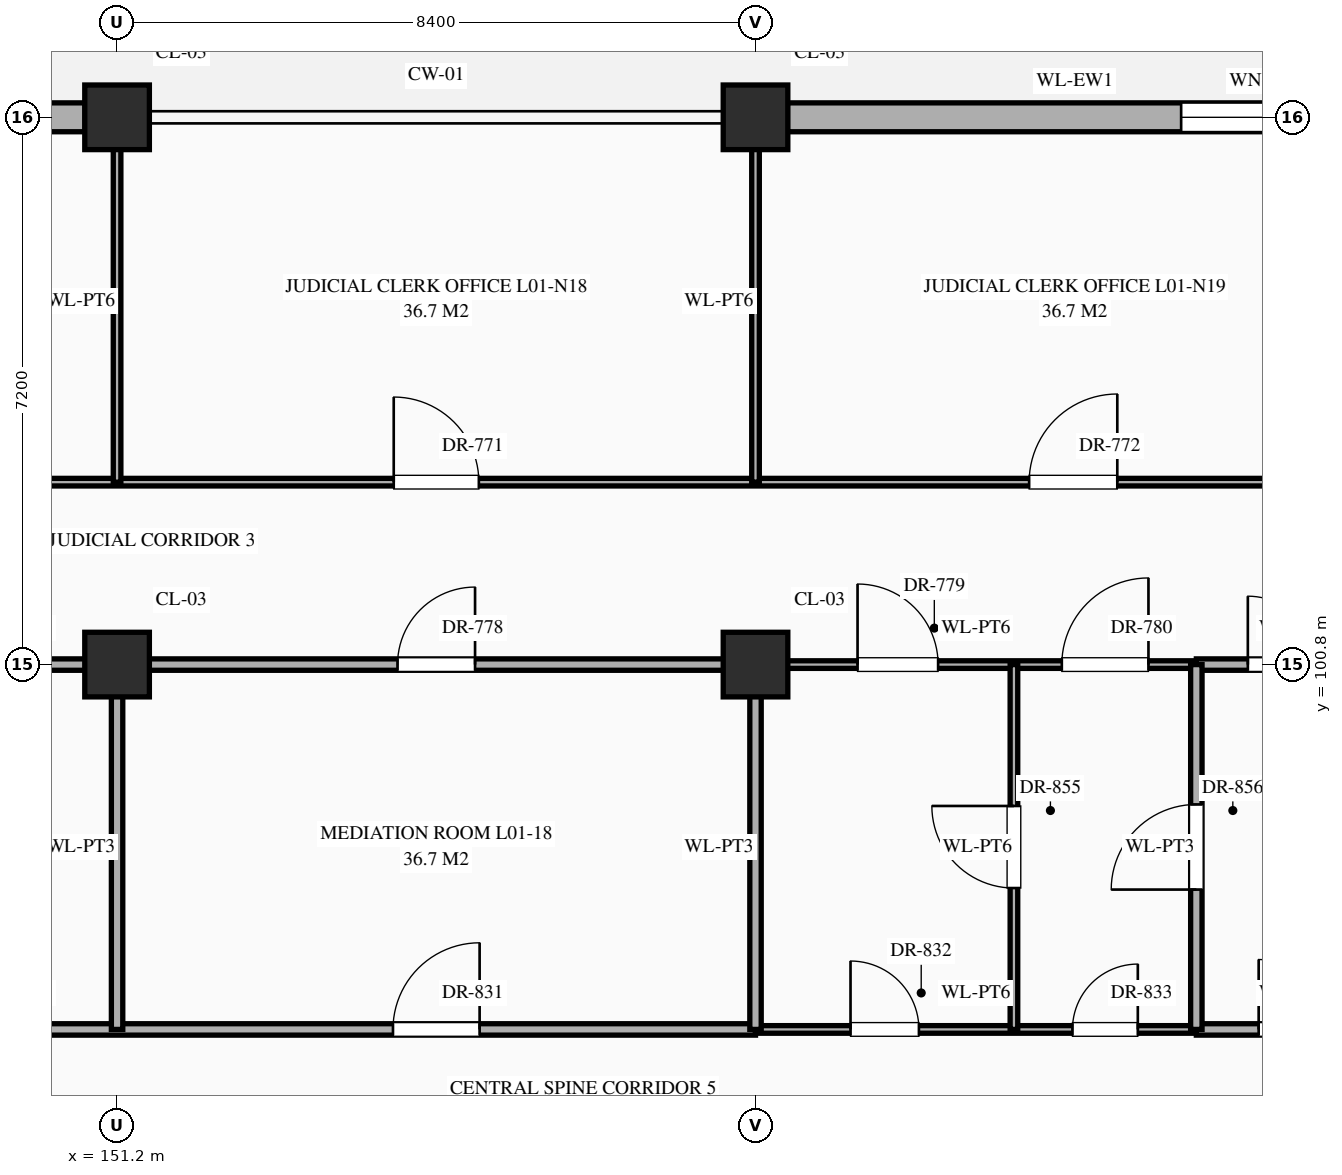
"""IFC4 building model, lengths in metres.
Left out: names, types, materials, properties, quantities, classifications, styles, units other than length and angle.
Written with IfcOpenShell. Run it as: python <this file> out.ifc"""

import sys

from ifc_helpers import new_model, si_unit, direction, frame, frame_2d, origin, origin_2d, place, context, subcontext, project, spatial, rectangle, extrude, element, fill, save


model = new_model("IFC4")
c1 = context("Model", 3, precision=1e-05, world=origin(), true_north=direction((0.0, 1.0)))
c2 = subcontext(c1, "Body", "Model", "MODEL_VIEW")
j1 = project(units=[si_unit("LENGTHUNIT", "METRE"), si_unit("PLANEANGLEUNIT", "RADIAN")], contexts=[c1])
p1 = place(None, origin())
s1 = spatial("IfcSite", under=j1, at=p1, CompositionType="ELEMENT")
p2 = place(p1, origin())
s2 = spatial("IfcBuilding", under=s1, at=p2, CompositionType="ELEMENT")
p3 = place(p2, origin())
s3 = spatial("IfcBuildingStorey", under=s2, at=p3, CompositionType="ELEMENT", Elevation=0.0)
for number, where, z_axis, x_axis in (
    (1, (151.2, 100.8, 0.0), (0.0, 0.0, 1.0), (1.0, 0.0, 0.0)),
    (2, (151.2, 108.0, 0.0), (0.0, 0.0, 1.0), (1.0, 0.0, 0.0)),
    (3, (159.6, 100.8, 0.0), (0.0, 0.0, 1.0), (1.0, 0.0, 0.0)),
    (4, (159.6, 108.0, 0.0), (0.0, 0.0, 1.0), (1.0, 0.0, 0.0)),
):
    element("IfcColumn", number, at=place(p3, frame(where, z_axis=z_axis, x_axis=x_axis)), inside=s3, PredefinedType="COLUMN", context=c2, shape_type="SweptSolid", body=[
        extrude(rectangle(XDim=0.85, YDim=0.85, at=origin_2d()), origin(), (0.0, 0.0, 1.0), 5.4),
    ])
p4 = place(p3, frame((143.22, 108.0, 0.0), z_axis=(0.0, 0.0, 1.0), x_axis=(1.0, 0.0, 0.0)))
e5 = element("IfcWall", 5, at=p4, inside=s3, PredefinedType="STANDARD", context=c2, shape_type="SweptSolid", body=[
    extrude(rectangle(XDim=7.56, YDim=0.38, at=frame_2d((3.78, 0.0))), origin(), (0.0, 0.0, 1.0), 4.47),
])
p5 = place(p4, frame((5.255, 0.0, 0.85)))
e6 = element("IfcOpeningElement", 6, at=p5, cuts=e5, PredefinedType="OPENING", context=c2, shape_type="SweptSolid", body=[
    extrude(rectangle(XDim=1.05, YDim=1.92, at=frame_2d((0.525, 0.96))), frame((0.0, 0.202, 0.0), z_axis=(0.0, -1.0, 0.0), x_axis=(1.0, 0.0, 0.0)), (0.0, 0.0, 1.0), 0.404),
])
p6 = place(p3, frame((160.02, 108.0, 0.0), z_axis=(0.0, 0.0, 1.0), x_axis=(1.0, 0.0, 0.0)))
e7 = element("IfcWall", 7, at=p6, inside=s3, PredefinedType="STANDARD", context=c2, shape_type="SweptSolid", body=[
    extrude(rectangle(XDim=7.56, YDim=0.38, at=frame_2d((3.78, 0.0))), origin(), (0.0, 0.0, 1.0), 4.47),
])
p7 = place(p6, frame((5.18, 0.0, 0.85)))
e8 = element("IfcOpeningElement", 8, at=p7, cuts=e7, PredefinedType="OPENING", context=c2, shape_type="SweptSolid", body=[
    extrude(rectangle(XDim=1.2, YDim=1.2, at=frame_2d((0.6, 0.6))), frame((0.0, 0.202, 0.0), z_axis=(0.0, -1.0, 0.0), x_axis=(1.0, 0.0, 0.0)), (0.0, 0.0, 1.0), 0.404),
])
p8 = place(p3, frame((140.2, 96.0, 0.0), z_axis=(0.0, 0.0, 1.0), x_axis=(1.0, 0.0, 0.0)))
e9 = element("IfcWall", 9, at=p8, inside=s3, PredefinedType="STANDARD", context=c2, shape_type="SweptSolid", body=[
    extrude(rectangle(XDim=19.4, YDim=0.15, at=frame_2d((9.7, 0.0))), origin(), (0.0, 0.0, 1.0), 5.12),
])
p9 = place(p8, frame((0.79, 0.0, 0.0)))
e10 = element("IfcOpeningElement", 10, at=p9, cuts=e9, PredefinedType="OPENING", context=c2, shape_type="SweptSolid", body=[
    extrude(rectangle(XDim=1.02, YDim=2.4, at=frame_2d((0.51, 1.2))), frame((0.0, 0.087, 0.0), z_axis=(0.0, -1.0, 0.0), x_axis=(1.0, 0.0, 0.0)), (0.0, 0.0, 1.0), 0.174),
])
p10 = place(p8, frame((6.27, 0.0, 0.0)))
e11 = element("IfcOpeningElement", 11, at=p10, cuts=e9, PredefinedType="OPENING", context=c2, shape_type="SweptSolid", body=[
    extrude(rectangle(XDim=1.06, YDim=2.4, at=frame_2d((0.53, 1.2))), frame((0.0, 0.087, 0.0), z_axis=(0.0, -1.0, 0.0), x_axis=(1.0, 0.0, 0.0)), (0.0, 0.0, 1.0), 0.174),
])
p11 = place(p8, frame((14.63, 0.0, 0.0)))
e12 = element("IfcOpeningElement", 12, at=p11, cuts=e9, PredefinedType="OPENING", context=c2, shape_type="SweptSolid", body=[
    extrude(rectangle(XDim=1.14, YDim=2.4, at=frame_2d((0.57, 1.2))), frame((0.0, 0.087, 0.0), z_axis=(0.0, -1.0, 0.0), x_axis=(1.0, 0.0, 0.0)), (0.0, 0.0, 1.0), 0.174),
])
p12 = place(p3, frame((159.6, 96.0, 0.0), z_axis=(0.0, 0.0, 1.0), x_axis=(1.0, 0.0, 0.0)))
e13 = element("IfcWall", 13, at=p12, inside=s3, PredefinedType="STANDARD", context=c2, shape_type="SweptSolid", body=[
    extrude(rectangle(XDim=5.8, YDim=0.1, at=frame_2d((2.9, 0.0))), origin(), (0.0, 0.0, 1.0), 5.12),
])
p13 = place(p12, frame((1.25, 0.0, 0.0)))
e14 = element("IfcOpeningElement", 14, at=p13, cuts=e13, PredefinedType="OPENING", context=c2, shape_type="SweptSolid", body=[
    extrude(rectangle(XDim=0.9, YDim=2.15, at=frame_2d((0.45, 1.075))), frame((0.0, 0.062, 0.0), z_axis=(0.0, -1.0, 0.0), x_axis=(1.0, 0.0, 0.0)), (0.0, 0.0, 1.0), 0.124),
])
p14 = place(p12, frame((4.17, 0.0, 0.0)))
e15 = element("IfcOpeningElement", 15, at=p14, cuts=e13, PredefinedType="OPENING", context=c2, shape_type="SweptSolid", body=[
    extrude(rectangle(XDim=0.86, YDim=2.1, at=frame_2d((0.43, 1.05))), frame((0.0, 0.062, 0.0), z_axis=(0.0, -1.0, 0.0), x_axis=(1.0, 0.0, 0.0)), (0.0, 0.0, 1.0), 0.124),
])
p15 = place(p3, frame((165.4, 96.0, 0.0), z_axis=(0.0, 0.0, 1.0), x_axis=(1.0, 0.0, 0.0)))
e16 = element("IfcWall", 16, at=p15, inside=s3, PredefinedType="STANDARD", context=c2, shape_type="SweptSolid", body=[
    extrude(rectangle(XDim=2.56, YDim=0.15, at=frame_2d((1.28, 0.0))), origin(), (0.0, 0.0, 1.0), 5.12),
])
p16 = place(p15, frame((0.82, 0.0, 0.0)))
e17 = element("IfcOpeningElement", 17, at=p16, cuts=e16, PredefinedType="OPENING", context=c2, shape_type="SweptSolid", body=[
    extrude(rectangle(XDim=0.92, YDim=2.15, at=frame_2d((0.46, 1.075))), frame((0.0, 0.087, 0.0), z_axis=(0.0, -1.0, 0.0), x_axis=(1.0, 0.0, 0.0)), (0.0, 0.0, 1.0), 0.174),
])
p17 = place(p3, frame((140.2, 100.8, 0.0), z_axis=(0.0, 0.0, 1.0), x_axis=(1.0, 0.0, 0.0)))
e18 = element("IfcWall", 18, at=p17, inside=s3, PredefinedType="STANDARD", context=c2, shape_type="SweptSolid", body=[
    extrude(rectangle(XDim=19.4, YDim=0.15, at=frame_2d((9.7, 0.0))), origin(), (0.0, 0.0, 1.0), 4.27),
])
p18 = place(p17, frame((0.657, 0.0, 0.0)))
e19 = element("IfcOpeningElement", 19, at=p18, cuts=e18, PredefinedType="OPENING", context=c2, shape_type="SweptSolid", body=[
    extrude(rectangle(XDim=0.94, YDim=2.3, at=frame_2d((0.47, 1.15))), frame((0.0, 0.087, 0.0), z_axis=(0.0, -1.0, 0.0), x_axis=(1.0, 0.0, 0.0)), (0.0, 0.0, 1.0), 0.174),
])
p19 = place(p17, frame((6.31, 0.0, 0.0)))
e20 = element("IfcOpeningElement", 20, at=p19, cuts=e18, PredefinedType="OPENING", context=c2, shape_type="SweptSolid", body=[
    extrude(rectangle(XDim=0.98, YDim=2.35, at=frame_2d((0.49, 1.175))), frame((0.0, 0.087, 0.0), z_axis=(0.0, -1.0, 0.0), x_axis=(1.0, 0.0, 0.0)), (0.0, 0.0, 1.0), 0.174),
])
p20 = place(p17, frame((14.69, 0.0, 0.0)))
e21 = element("IfcOpeningElement", 21, at=p20, cuts=e18, PredefinedType="OPENING", context=c2, shape_type="SweptSolid", body=[
    extrude(rectangle(XDim=1.02, YDim=2.4, at=frame_2d((0.51, 1.2))), frame((0.0, 0.087, 0.0), z_axis=(0.0, -1.0, 0.0), x_axis=(1.0, 0.0, 0.0)), (0.0, 0.0, 1.0), 0.174),
])
p21 = place(p3, frame((159.6, 100.8, 0.0), z_axis=(0.0, 0.0, 1.0), x_axis=(1.0, 0.0, 0.0)))
e22 = element("IfcWall", 22, at=p21, inside=s3, PredefinedType="STANDARD", context=c2, shape_type="SweptSolid", body=[
    extrude(rectangle(XDim=5.8, YDim=0.1, at=frame_2d((2.9, 0.0))), origin(), (0.0, 0.0, 1.0), 4.27),
])
p22 = place(p21, frame((1.343, 0.0, 0.0)))
e23 = element("IfcOpeningElement", 23, at=p22, cuts=e22, PredefinedType="OPENING", context=c2, shape_type="SweptSolid", body=[
    extrude(rectangle(XDim=1.06, YDim=2.4, at=frame_2d((0.53, 1.2))), frame((0.0, 0.062, 0.0), z_axis=(0.0, -1.0, 0.0), x_axis=(1.0, 0.0, 0.0)), (0.0, 0.0, 1.0), 0.124),
])
p23 = place(p21, frame((4.03, 0.0, 0.0)))
e24 = element("IfcOpeningElement", 24, at=p23, cuts=e22, PredefinedType="OPENING", context=c2, shape_type="SweptSolid", body=[
    extrude(rectangle(XDim=1.14, YDim=2.4, at=frame_2d((0.57, 1.2))), frame((0.0, 0.062, 0.0), z_axis=(0.0, -1.0, 0.0), x_axis=(1.0, 0.0, 0.0)), (0.0, 0.0, 1.0), 0.124),
])
p24 = place(p3, frame((165.4, 100.8, 0.0), z_axis=(0.0, 0.0, 1.0), x_axis=(1.0, 0.0, 0.0)))
e25 = element("IfcWall", 25, at=p24, inside=s3, PredefinedType="STANDARD", context=c2, shape_type="SweptSolid", body=[
    extrude(rectangle(XDim=2.56, YDim=0.15, at=frame_2d((1.28, 0.0))), origin(), (0.0, 0.0, 1.0), 4.27),
])
p25 = place(p24, frame((0.677, 0.0, 0.0)))
e26 = element("IfcOpeningElement", 26, at=p25, cuts=e25, PredefinedType="OPENING", context=c2, shape_type="SweptSolid", body=[
    extrude(rectangle(XDim=0.9, YDim=2.15, at=frame_2d((0.45, 1.075))), frame((0.0, 0.087, 0.0), z_axis=(0.0, -1.0, 0.0), x_axis=(1.0, 0.0, 0.0)), (0.0, 0.0, 1.0), 0.174),
])
p26 = place(p3, frame((126.0, 103.2, 0.0), z_axis=(0.0, 0.0, 1.0), x_axis=(1.0, 0.0, 0.0)))
e27 = element("IfcWall", 27, at=p26, inside=s3, PredefinedType="STANDARD", context=c2, shape_type="SweptSolid", body=[
    extrude(rectangle(XDim=41.96, YDim=0.1, at=frame_2d((20.98, 0.0))), origin(), (0.0, 0.0, 1.0), 5.12),
])
p27 = place(p26, frame((3.7, 0.0, 0.0)))
e28 = element("IfcOpeningElement", 28, at=p27, cuts=e27, PredefinedType="OPENING", context=c2, shape_type="SweptSolid", body=[
    extrude(rectangle(XDim=1.0, YDim=2.25, at=frame_2d((0.5, 1.125))), frame((0.0, 0.062, 0.0), z_axis=(0.0, -1.0, 0.0), x_axis=(1.0, 0.0, 0.0)), (0.0, 0.0, 1.0), 0.124),
])
p28 = place(p26, frame((12.08, 0.0, 0.0)))
e29 = element("IfcOpeningElement", 29, at=p28, cuts=e27, PredefinedType="OPENING", context=c2, shape_type="SweptSolid", body=[
    extrude(rectangle(XDim=1.04, YDim=2.2, at=frame_2d((0.52, 1.1))), frame((0.0, 0.062, 0.0), z_axis=(0.0, -1.0, 0.0), x_axis=(1.0, 0.0, 0.0)), (0.0, 0.0, 1.0), 0.124),
])
p29 = place(p26, frame((20.46, 0.0, 0.0)))
e30 = element("IfcOpeningElement", 30, at=p29, cuts=e27, PredefinedType="OPENING", context=c2, shape_type="SweptSolid", body=[
    extrude(rectangle(XDim=1.08, YDim=2.25, at=frame_2d((0.54, 1.125))), frame((0.0, 0.062, 0.0), z_axis=(0.0, -1.0, 0.0), x_axis=(1.0, 0.0, 0.0)), (0.0, 0.0, 1.0), 0.124),
])
p30 = place(p26, frame((28.84, 0.0, 0.0)))
e31 = element("IfcOpeningElement", 31, at=p30, cuts=e27, PredefinedType="OPENING", context=c2, shape_type="SweptSolid", body=[
    extrude(rectangle(XDim=1.12, YDim=2.25, at=frame_2d((0.56, 1.125))), frame((0.0, 0.062, 0.0), z_axis=(0.0, -1.0, 0.0), x_axis=(1.0, 0.0, 0.0)), (0.0, 0.0, 1.0), 0.124),
])
p31 = place(p26, frame((37.2, 0.0, 0.0)))
e32 = element("IfcOpeningElement", 32, at=p31, cuts=e27, PredefinedType="OPENING", context=c2, shape_type="SweptSolid", body=[
    extrude(rectangle(XDim=1.16, YDim=2.3, at=frame_2d((0.58, 1.15))), frame((0.0, 0.062, 0.0), z_axis=(0.0, -1.0, 0.0), x_axis=(1.0, 0.0, 0.0)), (0.0, 0.0, 1.0), 0.124),
])
p32 = place(p3, frame((151.2, 96.0, 0.0), z_axis=(0.0, 0.0, 1.0), x_axis=(0.0, 1.0, 0.0)))
e33 = element("IfcWall", 33, at=p32, inside=s3, PredefinedType="STANDARD", context=c2, shape_type="SweptSolid", body=[
    extrude(rectangle(XDim=4.8, YDim=0.15, at=frame_2d((2.4, 0.0))), origin(), (0.0, 0.0, 1.0), 4.37),
])
p33 = place(p3, frame((151.2, 103.2, 0.0), z_axis=(0.0, 0.0, 1.0), x_axis=(0.0, 1.0, 0.0)))
e34 = element("IfcWall", 34, at=p33, inside=s3, PredefinedType="STANDARD", context=c2, shape_type="SweptSolid", body=[
    extrude(rectangle(XDim=4.76, YDim=0.1, at=frame_2d((2.38, 0.0))), origin(), (0.0, 0.0, 1.0), 4.37),
])
p34 = place(p3, frame((159.6, 96.0, 0.0), z_axis=(0.0, 0.0, 1.0), x_axis=(0.0, 1.0, 0.0)))
e35 = element("IfcWall", 35, at=p34, inside=s3, PredefinedType="STANDARD", context=c2, shape_type="SweptSolid", body=[
    extrude(rectangle(XDim=4.8, YDim=0.15, at=frame_2d((2.4, 0.0))), origin(), (0.0, 0.0, 1.0), 4.37),
])
p35 = place(p3, frame((159.6, 103.2, 0.0), z_axis=(0.0, 0.0, 1.0), x_axis=(0.0, 1.0, 0.0)))
e36 = element("IfcWall", 36, at=p35, inside=s3, PredefinedType="STANDARD", context=c2, shape_type="SweptSolid", body=[
    extrude(rectangle(XDim=4.76, YDim=0.1, at=frame_2d((2.38, 0.0))), origin(), (0.0, 0.0, 1.0), 4.37),
])
p36 = place(p3, frame((163.0, 96.0, 0.0), z_axis=(0.0, 0.0, 1.0), x_axis=(0.0, 1.0, 0.0)))
e37 = element("IfcWall", 37, at=p36, inside=s3, PredefinedType="STANDARD", context=c2, shape_type="SweptSolid", body=[
    extrude(rectangle(XDim=4.8, YDim=0.1, at=frame_2d((2.4, 0.0))), origin(), (0.0, 0.0, 1.0), 5.12),
])
p37 = place(p36, frame((1.86, 0.0, 0.0)))
e38 = element("IfcOpeningElement", 38, at=p37, cuts=e37, PredefinedType="OPENING", context=c2, shape_type="SweptSolid", body=[
    extrude(rectangle(XDim=1.08, YDim=2.25, at=frame_2d((0.54, 1.125))), frame((0.0, 0.062, 0.0), z_axis=(0.0, -1.0, 0.0), x_axis=(1.0, 0.0, 0.0)), (0.0, 0.0, 1.0), 0.124),
])
p38 = place(p3, frame((165.4, 96.0, 0.0), z_axis=(0.0, 0.0, 1.0), x_axis=(0.0, 1.0, 0.0)))
e39 = element("IfcWall", 39, at=p38, inside=s3, PredefinedType="STANDARD", context=c2, shape_type="SweptSolid", body=[
    extrude(rectangle(XDim=4.8, YDim=0.15, at=frame_2d((2.4, 0.0))), origin(), (0.0, 0.0, 1.0), 5.12),
])
p39 = place(p38, frame((1.84, 0.0, 0.0)))
e40 = element("IfcOpeningElement", 40, at=p39, cuts=e39, PredefinedType="OPENING", context=c2, shape_type="SweptSolid", body=[
    extrude(rectangle(XDim=1.12, YDim=2.25, at=frame_2d((0.56, 1.125))), frame((0.0, 0.087, 0.0), z_axis=(0.0, -1.0, 0.0), x_axis=(1.0, 0.0, 0.0)), (0.0, 0.0, 1.0), 0.174),
])
p40 = place(p7, origin())
e41 = element("IfcWindow", 41, at=p40, inside=s3, PartitioningType="SINGLE_PANEL", PredefinedType="WINDOW", context=c2, shape_type="SweptSolid", body=[
    extrude(rectangle(XDim=1.2, YDim=1.2, at=frame_2d((0.6, 0.6))), frame((0.0, 0.03, 0.0), z_axis=(0.0, -1.0, 0.0), x_axis=(1.0, 0.0, 0.0)), (0.0, 0.0, 1.0), 0.06),
])
fill(e8, e41)
p41 = place(p30, origin())
e42 = element("IfcDoor", 42, at=p41, inside=s3, OperationType="SINGLE_SWING_LEFT", PredefinedType="DOOR", context=c2, shape_type="SweptSolid", body=[
    extrude(rectangle(XDim=1.12, YDim=2.25, at=frame_2d((0.56, 1.125))), frame((0.0, 0.025, 0.0), z_axis=(0.0, -1.0, 0.0), x_axis=(1.0, 0.0, 0.0)), (0.0, 0.0, 1.0), 0.05),
])
fill(e31, e42)
p42 = place(p31, origin())
e43 = element("IfcDoor", 43, at=p42, inside=s3, OperationType="SINGLE_SWING_RIGHT", PredefinedType="DOOR", context=c2, shape_type="SweptSolid", body=[
    extrude(rectangle(XDim=1.16, YDim=2.3, at=frame_2d((0.58, 1.15))), frame((0.0, 0.025, 0.0), z_axis=(0.0, -1.0, 0.0), x_axis=(1.0, 0.0, 0.0)), (0.0, 0.0, 1.0), 0.05),
])
fill(e32, e43)
p43 = place(p20, origin())
e44 = element("IfcDoor", 44, at=p43, inside=s3, OperationType="SINGLE_SWING_RIGHT", PredefinedType="DOOR", context=c2, shape_type="SweptSolid", body=[
    extrude(rectangle(XDim=1.02, YDim=2.4, at=frame_2d((0.51, 1.2))), frame((0.0, 0.025, 0.0), z_axis=(0.0, -1.0, 0.0), x_axis=(1.0, 0.0, 0.0)), (0.0, 0.0, 1.0), 0.05),
])
fill(e21, e44)
p44 = place(p22, origin())
e45 = element("IfcDoor", 45, at=p44, inside=s3, OperationType="SINGLE_SWING_LEFT", PredefinedType="DOOR", context=c2, shape_type="SweptSolid", body=[
    extrude(rectangle(XDim=1.06, YDim=2.4, at=frame_2d((0.53, 1.2))), frame((0.0, 0.025, 0.0), z_axis=(0.0, -1.0, 0.0), x_axis=(1.0, 0.0, 0.0)), (0.0, 0.0, 1.0), 0.05),
])
fill(e23, e45)
p45 = place(p23, origin())
e46 = element("IfcDoor", 46, at=p45, inside=s3, OperationType="SINGLE_SWING_RIGHT", PredefinedType="DOOR", context=c2, shape_type="SweptSolid", body=[
    extrude(rectangle(XDim=1.14, YDim=2.4, at=frame_2d((0.57, 1.2))), frame((0.0, 0.025, 0.0), z_axis=(0.0, -1.0, 0.0), x_axis=(1.0, 0.0, 0.0)), (0.0, 0.0, 1.0), 0.05),
])
fill(e24, e46)
p46 = place(p25, origin())
e47 = element("IfcDoor", 47, at=p46, inside=s3, OperationType="SINGLE_SWING_LEFT", PredefinedType="DOOR", context=c2, shape_type="SweptSolid", body=[
    extrude(rectangle(XDim=0.9, YDim=2.15, at=frame_2d((0.45, 1.075))), frame((0.0, 0.025, 0.0), z_axis=(0.0, -1.0, 0.0), x_axis=(1.0, 0.0, 0.0)), (0.0, 0.0, 1.0), 0.05),
])
fill(e26, e47)
p47 = place(p11, origin())
e48 = element("IfcDoor", 48, at=p47, inside=s3, OperationType="SINGLE_SWING_RIGHT", PredefinedType="DOOR", context=c2, shape_type="SweptSolid", body=[
    extrude(rectangle(XDim=1.14, YDim=2.4, at=frame_2d((0.57, 1.2))), frame((0.0, 0.025, 0.0), z_axis=(0.0, -1.0, 0.0), x_axis=(1.0, 0.0, 0.0)), (0.0, 0.0, 1.0), 0.05),
])
fill(e12, e48)
p48 = place(p13, origin())
e49 = element("IfcDoor", 49, at=p48, inside=s3, OperationType="SINGLE_SWING_LEFT", PredefinedType="DOOR", context=c2, shape_type="SweptSolid", body=[
    extrude(rectangle(XDim=0.9, YDim=2.15, at=frame_2d((0.45, 1.075))), frame((0.0, 0.025, 0.0), z_axis=(0.0, -1.0, 0.0), x_axis=(1.0, 0.0, 0.0)), (0.0, 0.0, 1.0), 0.05),
])
fill(e14, e49)
p49 = place(p14, origin())
e50 = element("IfcDoor", 50, at=p49, inside=s3, OperationType="SINGLE_SWING_RIGHT", PredefinedType="DOOR", context=c2, shape_type="SweptSolid", body=[
    extrude(rectangle(XDim=0.86, YDim=2.1, at=frame_2d((0.43, 1.05))), frame((0.0, 0.025, 0.0), z_axis=(0.0, -1.0, 0.0), x_axis=(1.0, 0.0, 0.0)), (0.0, 0.0, 1.0), 0.05),
])
fill(e15, e50)
p50 = place(p16, origin())
e51 = element("IfcDoor", 51, at=p50, inside=s3, OperationType="SINGLE_SWING_LEFT", PredefinedType="DOOR", context=c2, shape_type="SweptSolid", body=[
    extrude(rectangle(XDim=0.92, YDim=2.15, at=frame_2d((0.46, 1.075))), frame((0.0, 0.025, 0.0), z_axis=(0.0, -1.0, 0.0), x_axis=(1.0, 0.0, 0.0)), (0.0, 0.0, 1.0), 0.05),
])
fill(e17, e51)
p51 = place(p37, origin())
e52 = element("IfcDoor", 52, at=p51, inside=s3, OperationType="SINGLE_SWING_RIGHT", PredefinedType="DOOR", context=c2, shape_type="SweptSolid", body=[
    extrude(rectangle(XDim=1.08, YDim=2.25, at=frame_2d((0.54, 1.125))), frame((0.0, 0.025, 0.0), z_axis=(0.0, -1.0, 0.0), x_axis=(1.0, 0.0, 0.0)), (0.0, 0.0, 1.0), 0.05),
])
fill(e38, e52)
p52 = place(p39, origin())
e53 = element("IfcDoor", 53, at=p52, inside=s3, OperationType="SINGLE_SWING_LEFT", PredefinedType="DOOR", context=c2, shape_type="SweptSolid", body=[
    extrude(rectangle(XDim=1.12, YDim=2.25, at=frame_2d((0.56, 1.125))), frame((0.0, 0.025, 0.0), z_axis=(0.0, -1.0, 0.0), x_axis=(1.0, 0.0, 0.0)), (0.0, 0.0, 1.0), 0.05),
])
fill(e40, e53)
save(model, sys.argv[1])
